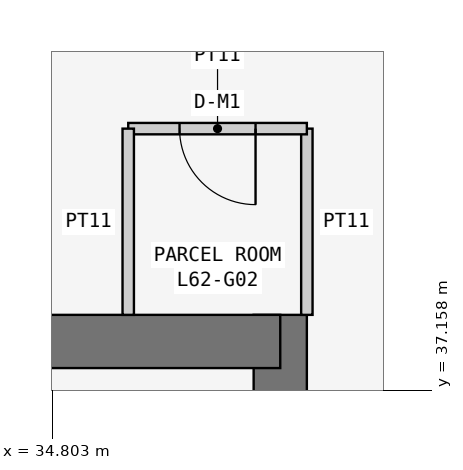
"""IFC4 building model, lengths in metres.
Left out: names, types, materials, properties, quantities, classifications, styles, units other than length and angle.
Written with IfcOpenShell. Run it as: python <this file> out.ifc"""

import sys

from ifc_helpers import new_model, si_unit, direction, frame, frame_2d, origin, place, context, subcontext, project, spatial, rectangle, extrude, element, fill, save


model = new_model("IFC4")
c1 = context("Model", 3, precision=1e-05, world=origin(), true_north=direction((0.0, 1.0)))
c2 = subcontext(c1, "Body", "Model", "MODEL_VIEW")
j1 = project(units=[si_unit("LENGTHUNIT", "METRE"), si_unit("PLANEANGLEUNIT", "RADIAN")], contexts=[c1])
p1 = place(None, origin())
s1 = spatial("IfcSite", under=j1, at=p1, CompositionType="ELEMENT")
p2 = place(p1, origin())
s2 = spatial("IfcBuilding", under=s1, at=p2, CompositionType="ELEMENT")
p3 = place(p2, frame((0.0, 0.0, 237.3)))
s3 = spatial("IfcBuildingStorey", under=s2, at=p3, CompositionType="ELEMENT", Elevation=237.3)
p4 = place(p3, frame((37.8, 21.0, 0.0), z_axis=(0.0, 0.0, 1.0), x_axis=(0.0, 1.0, 0.0)))
e1 = element("IfcWall", 1, at=p4, inside=s3, PredefinedType="SHEAR", context=c2, shape_type="SweptSolid", body=[
    extrude(rectangle(XDim=17.15, YDim=0.7, at=frame_2d((8.575, 0.0))), origin(), (0.0, 0.0, 1.0), 3.6),
])
p5 = place(p4, frame((5.2, 0.0, 0.0)))
e2 = element("IfcOpeningElement", 2, at=p5, cuts=e1, PredefinedType="OPENING", context=c2, shape_type="SweptSolid", body=[
    extrude(rectangle(XDim=1.2, YDim=2.1, at=frame_2d((0.6, 1.05))), frame((0.0, 0.36, 0.0), z_axis=(0.0, -1.0, 0.0), x_axis=(1.0, 0.0, 0.0)), (0.0, 0.0, 1.0), 0.72),
])
p6 = place(p3, frame((37.8, 37.8, 0.0), z_axis=(0.0, 0.0, 1.0), x_axis=(-1.0, 0.0, 0.0)))
e3 = element("IfcWall", 3, at=p6, inside=s3, PredefinedType="SHEAR", context=c2, shape_type="SweptSolid", body=[
    extrude(rectangle(XDim=17.15, YDim=0.7, at=frame_2d((8.575, 0.0))), origin(), (0.0, 0.0, 1.0), 3.6),
])
p7 = place(p3, frame((38.15, 38.15, 0.0), z_axis=(0.0, 0.0, 1.0), x_axis=(0.0, 1.0, 0.0)))
e4 = element("IfcWall", 4, at=p7, inside=s3, PredefinedType="PARTITIONING", context=c2, shape_type="SweptSolid", body=[
    extrude(rectangle(XDim=2.45, YDim=0.15, at=frame_2d((1.225, 0.0))), origin(), (0.0, 0.0, 1.0), 3.45),
])
p8 = place(p3, frame((38.15, 40.6, 0.0), z_axis=(0.0, 0.0, 1.0), x_axis=(-1.0, 0.0, 0.0)))
e5 = element("IfcWall", 5, at=p8, inside=s3, PredefinedType="PARTITIONING", context=c2, shape_type="SweptSolid", body=[
    extrude(rectangle(XDim=2.35, YDim=0.15, at=frame_2d((1.175, 0.0))), origin(), (0.0, 0.0, 1.0), 3.45),
])
p9 = place(p8, frame((0.675, 0.0, 0.0)))
e6 = element("IfcOpeningElement", 6, at=p9, cuts=e5, PredefinedType="OPENING", context=c2, shape_type="SweptSolid", body=[
    extrude(rectangle(XDim=1.0, YDim=2.1, at=frame_2d((0.5, 1.05))), frame((0.0, 0.085, 0.0), z_axis=(0.0, -1.0, 0.0), x_axis=(1.0, 0.0, 0.0)), (0.0, 0.0, 1.0), 0.17),
])
p10 = place(p3, frame((35.8, 40.6, 0.0), z_axis=(0.0, 0.0, 1.0), x_axis=(0.0, -1.0, 0.0)))
e7 = element("IfcWall", 7, at=p10, inside=s3, PredefinedType="PARTITIONING", context=c2, shape_type="SweptSolid", body=[
    extrude(rectangle(XDim=2.45, YDim=0.15, at=frame_2d((1.225, 0.0))), origin(), (0.0, 0.0, 1.0), 3.45),
])
p11 = place(p9, origin())
e8 = element("IfcDoor", 8, at=p11, inside=s3, OperationType="SINGLE_SWING_LEFT", PredefinedType="DOOR", context=c2, shape_type="SweptSolid", body=[
    extrude(rectangle(XDim=1.0, YDim=2.1, at=frame_2d((0.5, 1.05))), frame((0.0, 0.025, 0.0), z_axis=(0.0, -1.0, 0.0), x_axis=(1.0, 0.0, 0.0)), (0.0, 0.0, 1.0), 0.05),
])
fill(e6, e8)
save(model, sys.argv[1])
